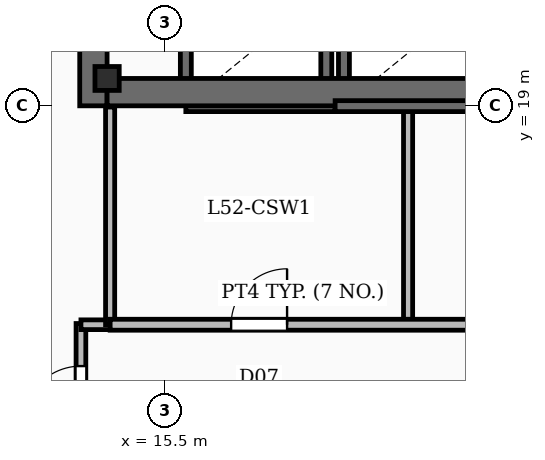
"""IFC4 building model, lengths in metres.
Left out: names, types, materials, properties, quantities, classifications, styles, units other than length and angle.
Written with IfcOpenShell. Run it as: python <this file> out.ifc"""

import sys

from ifc_helpers import new_model, si_unit, direction, frame, frame_2d, origin, origin_2d, place, context, subcontext, project, spatial, rectangle, i_section, extrude, element, fill, save


model = new_model("IFC4")
c1 = context("Model", 3, precision=1e-05, world=origin(), true_north=direction((0.0, 1.0)))
c2 = subcontext(c1, "Body", "Model", "MODEL_VIEW")
j1 = project(units=[si_unit("LENGTHUNIT", "METRE"), si_unit("PLANEANGLEUNIT", "RADIAN")], contexts=[c1])
p1 = place(None, origin())
s1 = spatial("IfcSite", under=j1, at=p1, CompositionType="ELEMENT")
p2 = place(p1, origin())
s2 = spatial("IfcBuilding", under=s1, at=p2, CompositionType="ELEMENT")
p3 = place(p2, frame((0.0, 0.0, 216.15)))
s3 = spatial("IfcBuildingStorey", under=s2, at=p3, CompositionType="ELEMENT", Elevation=216.15)
p4 = place(p3, frame((14.325, 19.0, -0.45), z_axis=(0.0, 0.0, 1.0), x_axis=(0.0, 1.0, 0.0)))
e1 = element("IfcWall", 1, at=p4, inside=s3, PredefinedType="SHEAR", context=c2, shape_type="SweptSolid", body=[
    extrude(rectangle(XDim=15.3, YDim=0.45, at=frame_2d((7.65, 0.0))), origin(), (0.0, 0.0, 1.0), 4.98),
])
p5 = place(p3, frame((14.55, 19.225, -0.45), z_axis=(0.0, 0.0, 1.0), x_axis=(1.0, 0.0, 0.0)))
e2 = element("IfcWall", 2, at=p5, inside=s3, PredefinedType="SHEAR", context=c2, shape_type="SweptSolid", body=[
    extrude(rectangle(XDim=9.8, YDim=0.45, at=frame_2d((4.9, 0.0))), origin(), (0.0, 0.0, 1.0), 4.98),
])
p6 = place(p3, frame((14.55, 19.45, -0.45), z_axis=(0.0, 0.0, 1.0), x_axis=(1.0, 0.0, 0.0)))
e3 = element("IfcColumn", 3, at=p6, inside=s3, PredefinedType="COLUMN", context=c2, shape_type="SweptSolid", body=[
    extrude(i_section(OverallWidth=0.399, OverallDepth=0.393, WebThickness=0.023, FlangeThickness=0.037, FilletRadius=0.02, at=origin_2d()), origin(), (0.0, 0.0, 1.0), 4.98),
])
p7 = place(p3, frame((10.211, 10.701, 0.0), z_axis=(0.0, 0.0, 1.0), x_axis=(0.113203107947, 0.993571867733, 0.0)))
e4 = element("IfcWall", 4, at=p7, inside=s3, PredefinedType="SOLIDWALL", context=c2, shape_type="SweptSolid", body=[
    extrude(rectangle(XDim=34.5, YDim=0.36, at=frame_2d((17.25, 0.0))), origin(), (0.0, 0.0, 1.0), 4.53),
])
p8 = place(p7, frame((4.2, 0.0, 0.88)))
e5 = element("IfcOpeningElement", 5, at=p8, cuts=e4, PredefinedType="OPENING", context=c2, shape_type="SweptSolid", body=[
    extrude(rectangle(XDim=1.35, YDim=2.2, at=frame_2d((0.675, 1.1))), frame((0.0, 0.19, 0.0), z_axis=(0.0, -1.0, 0.0), x_axis=(1.0, 0.0, 0.0)), (0.0, 0.0, 1.0), 0.38),
])
p9 = place(p7, frame((15.4, 0.0, 0.88)))
e6 = element("IfcOpeningElement", 6, at=p9, cuts=e4, PredefinedType="OPENING", context=c2, shape_type="SweptSolid", body=[
    extrude(rectangle(XDim=1.35, YDim=2.2, at=frame_2d((0.675, 1.1))), frame((0.0, 0.19, 0.0), z_axis=(0.0, -1.0, 0.0), x_axis=(1.0, 0.0, 0.0)), (0.0, 0.0, 1.0), 0.38),
])
p10 = place(p7, frame((26.6, 0.0, 0.88)))
e7 = element("IfcOpeningElement", 7, at=p10, cuts=e4, PredefinedType="OPENING", context=c2, shape_type="SweptSolid", body=[
    extrude(rectangle(XDim=1.35, YDim=2.2, at=frame_2d((0.675, 1.1))), frame((0.0, 0.19, 0.0), z_axis=(0.0, -1.0, 0.0), x_axis=(1.0, 0.0, 0.0)), (0.0, 0.0, 1.0), 0.38),
])
p11 = place(p3, frame((15.845, 18.995, 0.0), z_axis=(0.0, 0.0, 1.0), x_axis=(1.0, 0.0, 0.0)))
e8 = element("IfcWall", 8, at=p11, inside=s3, PredefinedType="SOLIDWALL", context=c2, shape_type="SweptSolid", body=[
    extrude(rectangle(XDim=2.455, YDim=0.18, at=frame_2d((1.228, 0.0))), origin(), (0.0, 0.0, 1.0), 4.53),
])
for number, where, z_axis, x_axis in (
    (9, (15.845, 19.085, 0.0), (0.0, 0.0, 1.0), (0.0, 1.0, 0.0)),
    (10, (18.155, 19.085, 0.0), (0.0, 0.0, 1.0), (0.0, 1.0, 0.0)),
):
    element("IfcWall", number, at=place(p3, frame(where, z_axis=z_axis, x_axis=x_axis)), inside=s3, PredefinedType="SOLIDWALL", context=c2, shape_type="SweptSolid", body=[
        extrude(rectangle(XDim=1.73, YDim=0.18, at=frame_2d((0.865, 0.0))), origin(), (0.0, 0.0, 1.0), 4.53),
    ])
p12 = place(p3, frame((18.3, 18.995, 0.0), z_axis=(0.0, 0.0, 1.0), x_axis=(1.0, 0.0, 0.0)))
e11 = element("IfcWall", 11, at=p12, inside=s3, PredefinedType="SOLIDWALL", context=c2, shape_type="SweptSolid", body=[
    extrude(rectangle(XDim=2.6, YDim=0.18, at=frame_2d((1.3, 0.0))), origin(), (0.0, 0.0, 1.0), 4.53),
])
p13 = place(p3, frame((18.445, 19.085, 0.0), z_axis=(0.0, 0.0, 1.0), x_axis=(0.0, 1.0, 0.0)))
e12 = element("IfcWall", 12, at=p13, inside=s3, PredefinedType="SOLIDWALL", context=c2, shape_type="SweptSolid", body=[
    extrude(rectangle(XDim=1.73, YDim=0.18, at=frame_2d((0.865, 0.0))), origin(), (0.0, 0.0, 1.0), 4.53),
])
p14 = place(p3, frame((19.5, 15.4, 0.0), z_axis=(0.0, 0.0, 1.0), x_axis=(0.0, 1.0, 0.0)))
e13 = element("IfcWall", 13, at=p14, inside=s3, PredefinedType="PARTITIONING", context=c2, shape_type="SweptSolid", body=[
    extrude(rectangle(XDim=3.58, YDim=0.15, at=frame_2d((1.79, 0.0))), origin(), (0.0, 0.0, 1.0), 3.59),
])
p15 = place(p3, frame((14.6, 15.4, 0.0), z_axis=(0.0, 0.0, 1.0), x_axis=(1.0, 0.0, 0.0)))
e14 = element("IfcWall", 14, at=p15, inside=s3, PredefinedType="PARTITIONING", context=c2, shape_type="SweptSolid", body=[
    extrude(rectangle(XDim=9.9, YDim=0.18, at=frame_2d((4.95, 0.0))), origin(), (0.0, 0.0, 1.0), 3.59),
])
p16 = place(p15, frame((1.99, 0.0, 0.0)))
e15 = element("IfcOpeningElement", 15, at=p16, cuts=e14, PredefinedType="OPENING", context=c2, shape_type="SweptSolid", body=[
    extrude(rectangle(XDim=0.92, YDim=2.1, at=frame_2d((0.46, 1.05))), frame((0.0, 0.1, 0.0), z_axis=(0.0, -1.0, 0.0), x_axis=(1.0, 0.0, 0.0)), (0.0, 0.0, 1.0), 0.2),
])
p17 = place(p15, frame((6.94, 0.0, 0.0)))
e16 = element("IfcOpeningElement", 16, at=p17, cuts=e14, PredefinedType="OPENING", context=c2, shape_type="SweptSolid", body=[
    extrude(rectangle(XDim=0.92, YDim=2.1, at=frame_2d((0.46, 1.05))), frame((0.0, 0.1, 0.0), z_axis=(0.0, -1.0, 0.0), x_axis=(1.0, 0.0, 0.0)), (0.0, 0.0, 1.0), 0.2),
])
p18 = place(p3, frame((14.6, 15.4, 0.0), z_axis=(0.0, 0.0, 1.0), x_axis=(0.0, 1.0, 0.0)))
e17 = element("IfcWall", 17, at=p18, inside=s3, PredefinedType="PARTITIONING", context=c2, shape_type="SweptSolid", body=[
    extrude(rectangle(XDim=3.58, YDim=0.15, at=frame_2d((1.79, 0.0))), origin(), (0.0, 0.0, 1.0), 3.59),
])
p19 = place(p3, frame((14.12, 15.4, 0.0), z_axis=(0.0, 0.0, 1.0), x_axis=(1.0, 0.0, 0.0)))
e18 = element("IfcWall", 18, at=p19, inside=s3, PredefinedType="PARTITIONING", context=c2, shape_type="SweptSolid", body=[
    extrude(rectangle(XDim=0.5, YDim=0.16, at=frame_2d((0.25, 0.0))), origin(), (0.0, 0.0, 1.0), 3.59),
])
p20 = place(p3, frame((14.12, 13.12, 0.0), z_axis=(0.0, 0.0, 1.0), x_axis=(0.0, 1.0, 0.0)))
e19 = element("IfcWall", 19, at=p20, inside=s3, PredefinedType="PARTITIONING", context=c2, shape_type="SweptSolid", body=[
    extrude(rectangle(XDim=2.3, YDim=0.16, at=frame_2d((1.15, 0.0))), origin(), (0.0, 0.0, 1.0), 3.59),
])
p21 = place(p20, frame((0.65, 0.0, 0.0)))
e20 = element("IfcOpeningElement", 20, at=p21, cuts=e19, PredefinedType="OPENING", context=c2, shape_type="SweptSolid", body=[
    extrude(rectangle(XDim=0.95, YDim=2.15, at=frame_2d((0.475, 1.075))), frame((0.0, 0.09, 0.0), z_axis=(0.0, -1.0, 0.0), x_axis=(1.0, 0.0, 0.0)), (0.0, 0.0, 1.0), 0.18),
])
p22 = place(p16, origin())
e21 = element("IfcDoor", 21, at=p22, inside=s3, OperationType="SINGLE_SWING_RIGHT", PredefinedType="DOOR", context=c2, shape_type="SweptSolid", body=[
    extrude(rectangle(XDim=0.92, YDim=2.1, at=frame_2d((0.46, 1.05))), frame((0.0, 0.025, 0.0), z_axis=(0.0, -1.0, 0.0), x_axis=(1.0, 0.0, 0.0)), (0.0, 0.0, 1.0), 0.05),
])
fill(e15, e21)
p23 = place(p21, origin())
e22 = element("IfcDoor", 22, at=p23, inside=s3, OperationType="SINGLE_SWING_LEFT", PredefinedType="DOOR", context=c2, shape_type="SweptSolid", body=[
    extrude(rectangle(XDim=0.95, YDim=2.15, at=frame_2d((0.475, 1.075))), frame((0.0, 0.025, 0.0), z_axis=(0.0, -1.0, 0.0), x_axis=(1.0, 0.0, 0.0)), (0.0, 0.0, 1.0), 0.05),
])
fill(e20, e22)
save(model, sys.argv[1])
